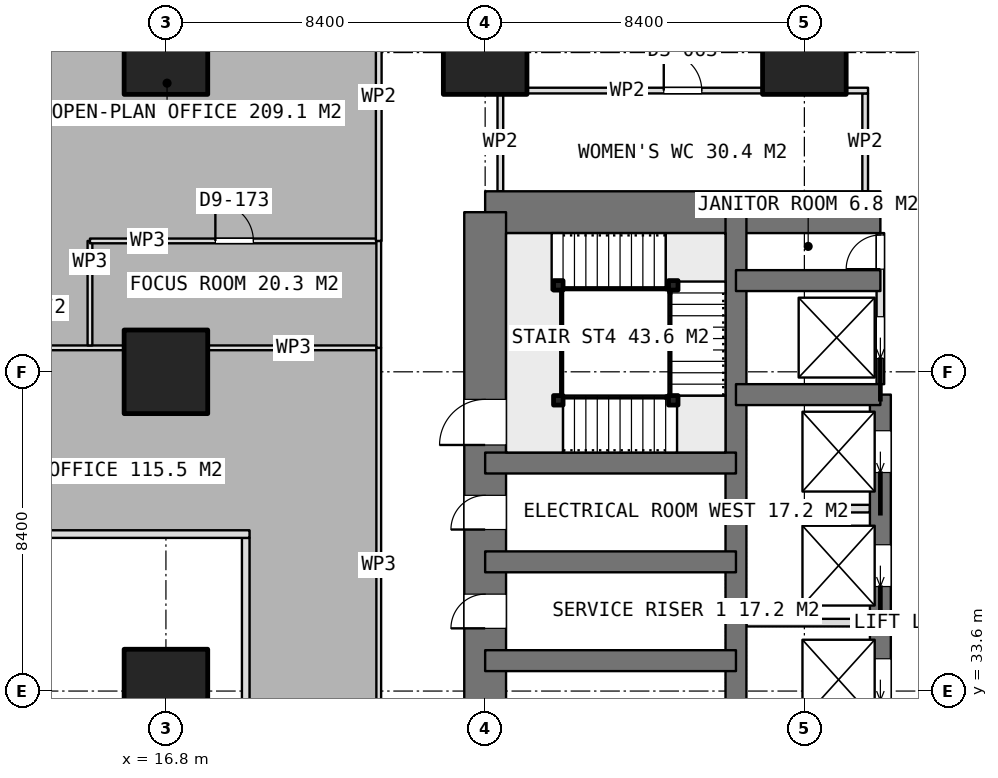
"""IFC4 building model, lengths in metres.
Left out: names, types, materials, properties, quantities, classifications, styles, units other than length and angle.
Written with IfcOpenShell. Run it as: python <this file> out.ifc"""

import sys

from ifc_helpers import new_model, si_unit, direction, frame, frame_2d, origin, origin_2d, place, context, subcontext, project, spatial, rectangle, extrude, element, fill, save


model = new_model("IFC4")
c1 = context("Model", 3, precision=1e-05, world=origin(), true_north=direction((0.0, 1.0)))
c2 = subcontext(c1, "Body", "Model", "MODEL_VIEW")
j1 = project(units=[si_unit("LENGTHUNIT", "METRE"), si_unit("PLANEANGLEUNIT", "RADIAN")], contexts=[c1])
p1 = place(None, origin())
s1 = spatial("IfcSite", under=j1, at=p1, CompositionType="ELEMENT")
p2 = place(p1, origin())
s2 = spatial("IfcBuilding", under=s1, at=p2, CompositionType="ELEMENT")
p3 = place(p2, frame((0.0, 0.0, 55.4)))
s3 = spatial("IfcBuildingStorey", under=s2, at=p3, CompositionType="ELEMENT", Elevation=55.4)
p4 = place(p3, frame((25.2, 46.2, 0.0), z_axis=(0.0, 0.0, 1.0), x_axis=(1.0, 0.0, 0.0)))
e1 = element("IfcWall", 1, at=p4, inside=s3, PredefinedType="SHEAR", context=c2, shape_type="SweptSolid", body=[
    extrude(rectangle(XDim=10.4, YDim=1.1, at=frame_2d((5.2, 0.0))), origin(), (0.0, 0.0, 1.0), 3.75),
])
p5 = place(p3, frame((25.2, 21.0, 0.0), z_axis=(0.0, 0.0, 1.0), x_axis=(0.0, 1.0, 0.0)))
e2 = element("IfcWall", 2, at=p5, inside=s3, PredefinedType="SHEAR", context=c2, shape_type="SweptSolid", body=[
    extrude(rectangle(XDim=25.2, YDim=1.1, at=frame_2d((12.6, 0.0))), origin(), (0.0, 0.0, 1.0), 3.75),
])
p6 = place(p5, frame((7.8, 0.0, 0.0)))
e3 = element("IfcOpeningElement", 3, at=p6, cuts=e2, PredefinedType="OPENING", context=c2, shape_type="SweptSolid", body=[
    extrude(rectangle(XDim=1.2, YDim=2.1, at=frame_2d((0.6, 1.05))), frame((0.0, 0.56, 0.0), z_axis=(0.0, -1.0, 0.0), x_axis=(1.0, 0.0, 0.0)), (0.0, 0.0, 1.0), 1.12),
])
p7 = place(p5, frame((14.25, 0.0, 0.0)))
e4 = element("IfcOpeningElement", 4, at=p7, cuts=e2, PredefinedType="OPENING", context=c2, shape_type="SweptSolid", body=[
    extrude(rectangle(XDim=0.9, YDim=2.1, at=frame_2d((0.45, 1.05))), frame((0.0, 0.56, 0.0), z_axis=(0.0, -1.0, 0.0), x_axis=(1.0, 0.0, 0.0)), (0.0, 0.0, 1.0), 1.12),
])
p8 = place(p5, frame((16.85, 0.0, 0.0)))
e5 = element("IfcOpeningElement", 5, at=p8, cuts=e2, PredefinedType="OPENING", context=c2, shape_type="SweptSolid", body=[
    extrude(rectangle(XDim=0.9, YDim=2.1, at=frame_2d((0.45, 1.05))), frame((0.0, 0.56, 0.0), z_axis=(0.0, -1.0, 0.0), x_axis=(1.0, 0.0, 0.0)), (0.0, 0.0, 1.0), 1.12),
])
p9 = place(p5, frame((19.075, 0.0, 0.0)))
e6 = element("IfcOpeningElement", 6, at=p9, cuts=e2, PredefinedType="OPENING", context=c2, shape_type="SweptSolid", body=[
    extrude(rectangle(XDim=1.2, YDim=2.1, at=frame_2d((0.6, 1.05))), frame((0.0, 0.56, 0.0), z_axis=(0.0, -1.0, 0.0), x_axis=(1.0, 0.0, 0.0)), (0.0, 0.0, 1.0), 1.12),
])
p10 = place(p3, frame((31.8, 21.0, 0.0), z_axis=(0.0, 0.0, 1.0), x_axis=(0.0, 1.0, 0.0)))
e7 = element("IfcWall", 7, at=p10, inside=s3, PredefinedType="SHEAR", context=c2, shape_type="SweptSolid", body=[
    extrude(rectangle(XDim=25.2, YDim=0.55, at=frame_2d((12.6, 0.0))), origin(), (0.0, 0.0, 1.0), 3.75),
])
p11 = place(p3, frame((35.6, 23.4, 0.0), z_axis=(0.0, 0.0, 1.0), x_axis=(0.0, 1.0, 0.0)))
e8 = element("IfcWall", 8, at=p11, inside=s3, PredefinedType="SHEAR", context=c2, shape_type="SweptSolid", body=[
    extrude(rectangle(XDim=18.0, YDim=0.55, at=frame_2d((9.0, 0.0))), origin(), (0.0, 0.0, 1.0), 3.75),
])
p12 = place(p11, frame((0.95, 0.0, 0.0)))
e9 = element("IfcOpeningElement", 9, at=p12, cuts=e8, PredefinedType="OPENING", context=c2, shape_type="SweptSolid", body=[
    extrude(rectangle(XDim=1.1, YDim=2.1, at=frame_2d((0.55, 1.05))), frame((0.0, 0.285, 0.0), z_axis=(0.0, -1.0, 0.0), x_axis=(1.0, 0.0, 0.0)), (0.0, 0.0, 1.0), 0.57),
])
p13 = place(p11, frame((3.95, 0.0, 0.0)))
e10 = element("IfcOpeningElement", 10, at=p13, cuts=e8, PredefinedType="OPENING", context=c2, shape_type="SweptSolid", body=[
    extrude(rectangle(XDim=1.1, YDim=2.1, at=frame_2d((0.55, 1.05))), frame((0.0, 0.285, 0.0), z_axis=(0.0, -1.0, 0.0), x_axis=(1.0, 0.0, 0.0)), (0.0, 0.0, 1.0), 0.57),
])
p14 = place(p11, frame((6.95, 0.0, 0.0)))
e11 = element("IfcOpeningElement", 11, at=p14, cuts=e8, PredefinedType="OPENING", context=c2, shape_type="SweptSolid", body=[
    extrude(rectangle(XDim=1.1, YDim=2.1, at=frame_2d((0.55, 1.05))), frame((0.0, 0.285, 0.0), z_axis=(0.0, -1.0, 0.0), x_axis=(1.0, 0.0, 0.0)), (0.0, 0.0, 1.0), 0.57),
])
p15 = place(p11, frame((9.95, 0.0, 0.0)))
e12 = element("IfcOpeningElement", 12, at=p15, cuts=e8, PredefinedType="OPENING", context=c2, shape_type="SweptSolid", body=[
    extrude(rectangle(XDim=1.1, YDim=2.1, at=frame_2d((0.55, 1.05))), frame((0.0, 0.285, 0.0), z_axis=(0.0, -1.0, 0.0), x_axis=(1.0, 0.0, 0.0)), (0.0, 0.0, 1.0), 0.57),
])
p16 = place(p11, frame((12.95, 0.0, 0.0)))
e13 = element("IfcOpeningElement", 13, at=p16, cuts=e8, PredefinedType="OPENING", context=c2, shape_type="SweptSolid", body=[
    extrude(rectangle(XDim=1.1, YDim=2.1, at=frame_2d((0.55, 1.05))), frame((0.0, 0.285, 0.0), z_axis=(0.0, -1.0, 0.0), x_axis=(1.0, 0.0, 0.0)), (0.0, 0.0, 1.0), 0.57),
])
p17 = place(p11, frame((15.95, 0.0, 0.0)))
e14 = element("IfcOpeningElement", 14, at=p17, cuts=e8, PredefinedType="OPENING", context=c2, shape_type="SweptSolid", body=[
    extrude(rectangle(XDim=1.1, YDim=2.1, at=frame_2d((0.55, 1.05))), frame((0.0, 0.285, 0.0), z_axis=(0.0, -1.0, 0.0), x_axis=(1.0, 0.0, 0.0)), (0.0, 0.0, 1.0), 0.57),
])
for number, where, z_axis, x_axis in (
    (15, (31.8, 41.4, 0.0), (0.0, 0.0, 1.0), (1.0, 0.0, 0.0)),
    (16, (31.8, 44.4, 0.0), (0.0, 0.0, 1.0), (1.0, 0.0, 0.0)),
):
    element("IfcWall", number, at=place(p3, frame(where, z_axis=z_axis, x_axis=x_axis)), inside=s3, PredefinedType="SHEAR", context=c2, shape_type="SweptSolid", body=[
        extrude(rectangle(XDim=3.8, YDim=0.55, at=frame_2d((1.9, 0.0))), origin(), (0.0, 0.0, 1.0), 3.75),
    ])
for number, where, z_axis, x_axis in (
    (17, (25.2, 34.4, 0.0), (0.0, 0.0, 1.0), (1.0, 0.0, 0.0)),
    (18, (25.2, 37.0, 0.0), (0.0, 0.0, 1.0), (1.0, 0.0, 0.0)),
    (19, (25.2, 39.6, 0.0), (0.0, 0.0, 1.0), (1.0, 0.0, 0.0)),
):
    element("IfcWall", number, at=place(p3, frame(where, z_axis=z_axis, x_axis=x_axis)), inside=s3, PredefinedType="SHEAR", context=c2, shape_type="SweptSolid", body=[
        extrude(rectangle(XDim=6.6, YDim=0.55, at=frame_2d((3.3, 0.0))), origin(), (0.0, 0.0, 1.0), 3.75),
    ])
for number, where, z_axis, x_axis in (
    (20, (16.8, 33.6, 0.0), (0.0, 0.0, 1.0), (1.0, 0.0, 0.0)),
    (21, (16.8, 42.0, 0.0), (0.0, 0.0, 1.0), (1.0, 0.0, 0.0)),
    (22, (16.8, 50.4, 0.0), (0.0, 0.0, 1.0), (1.0, 0.0, 0.0)),
    (23, (25.2, 50.4, 0.0), (0.0, 0.0, 1.0), (1.0, 0.0, 0.0)),
    (24, (33.6, 50.4, 0.0), (0.0, 0.0, 1.0), (1.0, 0.0, 0.0)),
):
    element("IfcColumn", number, at=place(p3, frame(where, z_axis=z_axis, x_axis=x_axis)), inside=s3, PredefinedType="COLUMN", context=c2, shape_type="SweptSolid", body=[
        extrude(rectangle(XDim=2.2, YDim=2.2, at=origin_2d()), origin(), (0.0, 0.0, 1.0), 3.75),
    ])
for number, where, z_axis, x_axis in (
    (25, (32.075, 35.4, 0.0), (0.0, 0.0, 1.0), (1.0, 0.0, 0.0)),
    (26, (32.075, 38.4, 0.0), (0.0, 0.0, 1.0), (1.0, 0.0, 0.0)),
):
    element("IfcWall", number, at=place(p3, frame(where, z_axis=z_axis, x_axis=x_axis)), inside=s3, PredefinedType="PARTITIONING", context=c2, shape_type="SweptSolid", body=[
        extrude(rectangle(XDim=3.25, YDim=0.2, at=frame_2d((1.625, 0.0))), origin(), (0.0, 0.0, 1.0), 3.5),
    ])
p18 = place(p3, frame((35.6, 41.675, 0.0), z_axis=(0.0, 0.0, 1.0), x_axis=(0.0, 1.0, 0.0)))
e27 = element("IfcWall", 27, at=p18, inside=s3, PredefinedType="PARTITIONING", context=c2, shape_type="SweptSolid", body=[
    extrude(rectangle(XDim=3.975, YDim=0.2, at=frame_2d((1.987, 0.0))), origin(), (0.0, 0.0, 1.0), 3.5),
])
p19 = place(p18, frame((3.025, 0.0, 0.0)))
e28 = element("IfcOpeningElement", 28, at=p19, cuts=e27, PredefinedType="OPENING", context=c2, shape_type="SweptSolid", body=[
    extrude(rectangle(XDim=0.9, YDim=2.1, at=frame_2d((0.45, 1.05))), frame((0.0, 0.11, 0.0), z_axis=(0.0, -1.0, 0.0), x_axis=(1.0, 0.0, 0.0)), (0.0, 0.0, 1.0), 0.22),
])
p20 = place(p18, frame((0.675, 0.0, 0.0)))
e29 = element("IfcOpeningElement", 29, at=p20, cuts=e27, PredefinedType="OPENING", context=c2, shape_type="SweptSolid", body=[
    extrude(rectangle(XDim=1.1, YDim=2.1, at=frame_2d((0.55, 1.05))), frame((0.0, 0.11, 0.0), z_axis=(0.0, -1.0, 0.0), x_axis=(1.0, 0.0, 0.0)), (0.0, 0.0, 1.0), 0.22),
])
p21 = place(p3, frame((25.525, 49.4, 0.0), z_axis=(0.0, 0.0, 1.0), x_axis=(1.0, 0.0, 0.0)))
e30 = element("IfcWall", 30, at=p21, inside=s3, PredefinedType="PARTITIONING", context=c2, shape_type="SweptSolid", body=[
    extrude(rectangle(XDim=9.75, YDim=0.15, at=frame_2d((4.875, 0.0))), origin(), (0.0, 0.0, 1.0), 3.5),
])
p22 = place(p21, frame((4.375, 0.0, 0.0)))
e31 = element("IfcOpeningElement", 31, at=p22, cuts=e30, PredefinedType="OPENING", context=c2, shape_type="SweptSolid", body=[
    extrude(rectangle(XDim=1.0, YDim=2.1, at=frame_2d((0.5, 1.05))), frame((0.0, 0.085, 0.0), z_axis=(0.0, -1.0, 0.0), x_axis=(1.0, 0.0, 0.0)), (0.0, 0.0, 1.0), 0.17),
])
for number, where, z_axis, x_axis in (
    (32, (25.6, 46.75, 0.0), (0.0, 0.0, 1.0), (0.0, 1.0, 0.0)),
    (33, (35.2, 46.75, 0.0), (0.0, 0.0, 1.0), (0.0, 1.0, 0.0)),
):
    element("IfcWall", number, at=place(p3, frame(where, z_axis=z_axis, x_axis=x_axis)), inside=s3, PredefinedType="PARTITIONING", context=c2, shape_type="SweptSolid", body=[
        extrude(rectangle(XDim=2.575, YDim=0.15, at=frame_2d((1.288, 0.0))), origin(), (0.0, 0.0, 1.0), 3.5),
    ])
p23 = place(p3, frame((10.891, 42.631, 0.0), z_axis=(0.0, 0.0, 1.0), x_axis=(1.0, 0.0, 0.0)))
e34 = element("IfcWall", 34, at=p23, inside=s3, PredefinedType="PARTITIONING", context=c2, shape_type="SweptSolid", body=[
    extrude(rectangle(XDim=4.789, YDim=0.125, at=frame_2d((2.395, 0.0))), origin(), (0.0, 0.0, 1.0), 3.5),
])
p24 = place(p23, frame((1.86, 0.0, 0.0)))
e35 = element("IfcOpeningElement", 35, at=p24, cuts=e34, PredefinedType="OPENING", context=c2, shape_type="SweptSolid", body=[
    extrude(rectangle(XDim=1.0, YDim=2.1, at=frame_2d((0.5, 1.05))), frame((0.0, 0.073, 0.0), z_axis=(0.0, -1.0, 0.0), x_axis=(1.0, 0.0, 0.0)), (0.0, 0.0, 1.0), 0.145),
])
p25 = place(p3, frame((17.92, 42.631, 0.0), z_axis=(0.0, 0.0, 1.0), x_axis=(1.0, 0.0, 0.0)))
e36 = element("IfcWall", 36, at=p25, inside=s3, PredefinedType="PARTITIONING", context=c2, shape_type="SweptSolid", body=[
    extrude(rectangle(XDim=4.48, YDim=0.125, at=frame_2d((2.24, 0.0))), origin(), (0.0, 0.0, 1.0), 3.5),
])
p26 = place(p3, frame((22.4, 42.631, 0.0), z_axis=(0.0, 0.0, 1.0), x_axis=(0.0, -1.0, 0.0)))
e37 = element("IfcWall", 37, at=p26, inside=s3, PredefinedType="PARTITIONING", context=c2, shape_type="SweptSolid", body=[
    extrude(rectangle(XDim=11.431, YDim=0.125, at=frame_2d((5.716, 0.0))), origin(), (0.0, 0.0, 1.0), 3.5),
])
p27 = place(p3, frame((14.801, 42.694, 0.0), z_axis=(0.0, 0.0, 1.0), x_axis=(0.0, 1.0, 0.0)))
e38 = element("IfcWall", 38, at=p27, inside=s3, PredefinedType="PARTITIONING", context=c2, shape_type="SweptSolid", body=[
    extrude(rectangle(XDim=2.75, YDim=0.125, at=frame_2d((1.375, 0.0))), origin(), (0.0, 0.0, 1.0), 3.5),
])
p28 = place(p3, frame((14.801, 45.444, 0.0), z_axis=(0.0, 0.0, 1.0), x_axis=(1.0, 0.0, 0.0)))
e39 = element("IfcWall", 39, at=p28, inside=s3, PredefinedType="PARTITIONING", context=c2, shape_type="SweptSolid", body=[
    extrude(rectangle(XDim=7.599, YDim=0.125, at=frame_2d((3.799, 0.0))), origin(), (0.0, 0.0, 1.0), 3.5),
])
p29 = place(p28, frame((3.3, 0.0, 0.0)))
e40 = element("IfcOpeningElement", 40, at=p29, cuts=e39, PredefinedType="OPENING", context=c2, shape_type="SweptSolid", body=[
    extrude(rectangle(XDim=1.0, YDim=2.1, at=frame_2d((0.5, 1.05))), frame((0.0, 0.073, 0.0), z_axis=(0.0, -1.0, 0.0), x_axis=(1.0, 0.0, 0.0)), (0.0, 0.0, 1.0), 0.145),
])
p30 = place(p3, frame((22.4, 45.444, 0.0), z_axis=(0.0, 0.0, 1.0), x_axis=(0.0, -1.0, 0.0)))
e41 = element("IfcWall", 41, at=p30, inside=s3, PredefinedType="PARTITIONING", context=c2, shape_type="SweptSolid", body=[
    extrude(rectangle(XDim=2.813, YDim=0.125, at=frame_2d((1.406, 0.0))), origin(), (0.0, 0.0, 1.0), 3.5),
])
p31 = place(p3, frame((22.4, 53.0, 0.0), z_axis=(0.0, 0.0, 1.0), x_axis=(0.0, -1.0, 0.0)))
e42 = element("IfcWall", 42, at=p31, inside=s3, PredefinedType="PARTITIONING", context=c2, shape_type="SweptSolid", body=[
    extrude(rectangle(XDim=7.556, YDim=0.15, at=frame_2d((3.778, 0.0))), origin(), (0.0, 0.0, 1.0), 3.5),
])
for number, where, z_axis, x_axis in (
    (43, (27.125, 41.25, 0.0), (0.0, 0.0, 1.0), (1.0, 0.0, 0.0)),
    (44, (30.15, 41.25, 0.0), (0.0, 0.0, 1.0), (1.0, 0.0, 0.0)),
    (45, (30.15, 44.275, 0.0), (0.0, 0.0, 1.0), (1.0, 0.0, 0.0)),
    (46, (27.125, 44.275, 0.0), (0.0, 0.0, 1.0), (1.0, 0.0, 0.0)),
):
    element("IfcColumn", number, at=place(p3, frame(where, z_axis=z_axis, x_axis=x_axis)), inside=s3, PredefinedType="COLUMN", context=c2, shape_type="SweptSolid", body=[
        extrude(rectangle(XDim=0.25, YDim=0.25, at=origin_2d()), origin(), (0.0, 0.0, 1.0), 3.75),
    ])
p32 = place(p3, frame((18.9, 14.597, 0.0), z_axis=(0.0, 0.0, 1.0), x_axis=(0.0, 1.0, 0.0)))
e47 = element("IfcWall", 47, at=p32, inside=s3, PredefinedType="PARTITIONING", context=c2, shape_type="SweptSolid", body=[
    extrude(rectangle(XDim=23.033, YDim=0.2, at=frame_2d((11.517, 0.0))), origin(), (0.0, 0.0, 1.0), 3.5),
])
p33 = place(p32, frame((14.203, 0.0, 0.0)))
e48 = element("IfcOpeningElement", 48, at=p33, cuts=e47, PredefinedType="OPENING", context=c2, shape_type="SweptSolid", body=[
    extrude(rectangle(XDim=1.2, YDim=2.1, at=frame_2d((0.6, 1.05))), frame((0.0, 0.11, 0.0), z_axis=(0.0, -1.0, 0.0), x_axis=(1.0, 0.0, 0.0)), (0.0, 0.0, 1.0), 0.22),
])
p34 = place(p3, frame((5.339, 37.73, 0.0), z_axis=(0.0, 0.0, 1.0), x_axis=(1.0, 0.0, 0.0)))
e49 = element("IfcWall", 49, at=p34, inside=s3, PredefinedType="PARTITIONING", context=c2, shape_type="SweptSolid", body=[
    extrude(rectangle(XDim=13.661, YDim=0.2, at=frame_2d((6.831, 0.0))), origin(), (0.0, 0.0, 1.0), 3.5),
])
p35 = place(p7, origin())
e50 = element("IfcDoor", 50, at=p35, inside=s3, OperationType="SINGLE_SWING_LEFT", PredefinedType="DOOR", context=c2, shape_type="SweptSolid", body=[
    extrude(rectangle(XDim=0.9, YDim=2.1, at=frame_2d((0.45, 1.05))), frame((0.0, 0.025, 0.0), z_axis=(0.0, -1.0, 0.0), x_axis=(1.0, 0.0, 0.0)), (0.0, 0.0, 1.0), 0.05),
])
fill(e4, e50)
p36 = place(p8, origin())
e51 = element("IfcDoor", 51, at=p36, inside=s3, OperationType="SINGLE_SWING_LEFT", PredefinedType="DOOR", context=c2, shape_type="SweptSolid", body=[
    extrude(rectangle(XDim=0.9, YDim=2.1, at=frame_2d((0.45, 1.05))), frame((0.0, 0.025, 0.0), z_axis=(0.0, -1.0, 0.0), x_axis=(1.0, 0.0, 0.0)), (0.0, 0.0, 1.0), 0.05),
])
fill(e5, e51)
p37 = place(p19, origin())
e52 = element("IfcDoor", 52, at=p37, inside=s3, OperationType="SINGLE_SWING_LEFT", PredefinedType="DOOR", context=c2, shape_type="SweptSolid", body=[
    extrude(rectangle(XDim=0.9, YDim=2.1, at=frame_2d((0.45, 1.05))), frame((0.0, 0.025, 0.0), z_axis=(0.0, -1.0, 0.0), x_axis=(1.0, 0.0, 0.0)), (0.0, 0.0, 1.0), 0.05),
])
fill(e28, e52)
p38 = place(p15, origin())
e53 = element("IfcDoor", 53, at=p38, inside=s3, OperationType="SLIDING_TO_LEFT", PredefinedType="USERDEFINED", context=c2, shape_type="SweptSolid", body=[
    extrude(rectangle(XDim=1.1, YDim=2.1, at=frame_2d((0.55, 1.05))), frame((0.0, 0.025, 0.0), z_axis=(0.0, -1.0, 0.0), x_axis=(1.0, 0.0, 0.0)), (0.0, 0.0, 1.0), 0.05),
])
fill(e12, e53)
p39 = place(p16, origin())
e54 = element("IfcDoor", 54, at=p39, inside=s3, OperationType="SLIDING_TO_LEFT", PredefinedType="USERDEFINED", context=c2, shape_type="SweptSolid", body=[
    extrude(rectangle(XDim=1.1, YDim=2.1, at=frame_2d((0.55, 1.05))), frame((0.0, 0.025, 0.0), z_axis=(0.0, -1.0, 0.0), x_axis=(1.0, 0.0, 0.0)), (0.0, 0.0, 1.0), 0.05),
])
fill(e13, e54)
p40 = place(p17, origin())
e55 = element("IfcDoor", 55, at=p40, inside=s3, OperationType="SLIDING_TO_LEFT", PredefinedType="USERDEFINED", context=c2, shape_type="SweptSolid", body=[
    extrude(rectangle(XDim=1.1, YDim=2.1, at=frame_2d((0.55, 1.05))), frame((0.0, 0.025, 0.0), z_axis=(0.0, -1.0, 0.0), x_axis=(1.0, 0.0, 0.0)), (0.0, 0.0, 1.0), 0.05),
])
fill(e14, e55)
p41 = place(p20, origin())
e56 = element("IfcDoor", 56, at=p41, inside=s3, OperationType="SLIDING_TO_LEFT", PredefinedType="USERDEFINED", context=c2, shape_type="SweptSolid", body=[
    extrude(rectangle(XDim=1.1, YDim=2.1, at=frame_2d((0.55, 1.05))), frame((0.0, 0.025, 0.0), z_axis=(0.0, -1.0, 0.0), x_axis=(1.0, 0.0, 0.0)), (0.0, 0.0, 1.0), 0.05),
])
fill(e29, e56)
p42 = place(p22, origin())
e57 = element("IfcDoor", 57, at=p42, inside=s3, OperationType="SINGLE_SWING_LEFT", PredefinedType="DOOR", context=c2, shape_type="SweptSolid", body=[
    extrude(rectangle(XDim=1.0, YDim=2.1, at=frame_2d((0.5, 1.05))), frame((0.0, 0.025, 0.0), z_axis=(0.0, -1.0, 0.0), x_axis=(1.0, 0.0, 0.0)), (0.0, 0.0, 1.0), 0.05),
])
fill(e31, e57)
p43 = place(p29, origin())
e58 = element("IfcDoor", 58, at=p43, inside=s3, OperationType="SINGLE_SWING_LEFT", PredefinedType="DOOR", context=c2, shape_type="SweptSolid", body=[
    extrude(rectangle(XDim=1.0, YDim=2.1, at=frame_2d((0.5, 1.05))), frame((0.0, 0.025, 0.0), z_axis=(0.0, -1.0, 0.0), x_axis=(1.0, 0.0, 0.0)), (0.0, 0.0, 1.0), 0.05),
])
fill(e40, e58)
p44 = place(p9, origin())
e59 = element("IfcDoor", 59, at=p44, inside=s3, OperationType="SINGLE_SWING_RIGHT", PredefinedType="DOOR", context=c2, shape_type="SweptSolid", body=[
    extrude(rectangle(XDim=1.2, YDim=2.1, at=frame_2d((0.6, 1.05))), frame((0.0, 0.025, 0.0), z_axis=(0.0, -1.0, 0.0), x_axis=(1.0, 0.0, 0.0)), (0.0, 0.0, 1.0), 0.05),
])
fill(e6, e59)
save(model, sys.argv[1])
